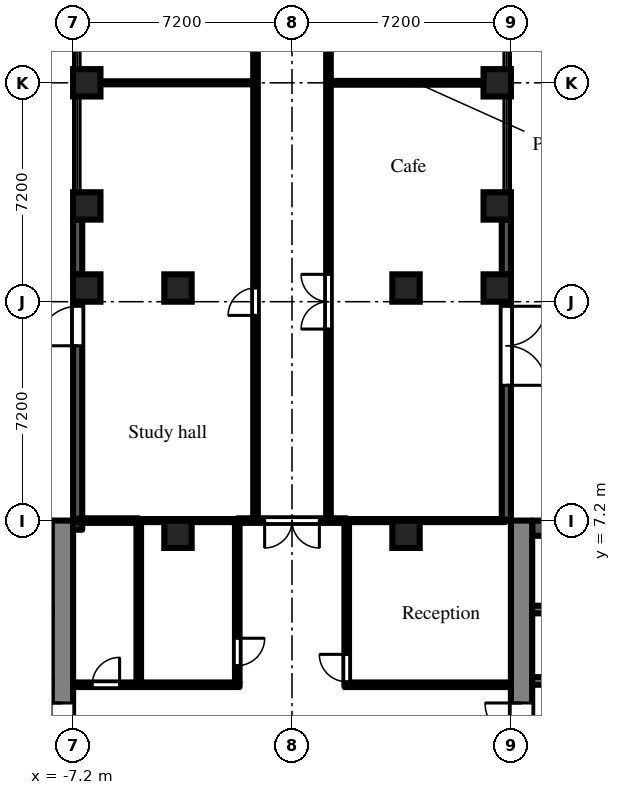
"""IFC4 building model, lengths in metres.
Left out: names, types, materials, properties, quantities, classifications, styles, units other than length and angle.
Written with IfcOpenShell. Run it as: python <this file> out.ifc"""

import sys

from ifc_helpers import new_model, si_unit, direction, frame, frame_2d, origin, origin_2d, place, context, subcontext, project, spatial, rectangle, extrude, element, fill, save


model = new_model("IFC4")
c1 = context("Model", 3, precision=1e-05, world=origin(), true_north=direction((0.0, 1.0)))
c2 = subcontext(c1, "Body", "Model", "MODEL_VIEW")
j1 = project(units=[si_unit("LENGTHUNIT", "METRE"), si_unit("PLANEANGLEUNIT", "RADIAN")], contexts=[c1])
p1 = place(None, origin())
s1 = spatial("IfcSite", under=j1, at=p1, CompositionType="ELEMENT")
p2 = place(p1, origin())
s2 = spatial("IfcBuilding", under=s1, at=p2, CompositionType="ELEMENT")
p3 = place(p2, frame((0.0, 0.0, 7.2)))
s3 = spatial("IfcBuildingStorey", under=s2, at=p3, CompositionType="ELEMENT", Elevation=7.2)
for number, where, z_axis, x_axis in (
    (1, (-6.75, 14.85, 0.0), (0.0, 0.0, 1.0), (1.0, 0.0, 0.0)),
    (2, (-6.75, 17.55, 0.0), (0.0, 0.0, 1.0), (1.0, 0.0, 0.0)),
    (3, (-6.75, 21.6, 0.0), (0.0, 0.0, 1.0), (1.0, 0.0, 0.0)),
    (4, (-3.75, 6.75, 0.0), (0.0, 0.0, 1.0), (1.0, 0.0, 0.0)),
    (5, (-3.75, 14.85, 0.0), (0.0, 0.0, 1.0), (1.0, 0.0, 0.0)),
    (6, (3.75, 6.75, 0.0), (0.0, 0.0, 1.0), (1.0, 0.0, 0.0)),
    (7, (3.75, 14.85, 0.0), (0.0, 0.0, 1.0), (1.0, 0.0, 0.0)),
    (8, (6.75, 14.85, 0.0), (0.0, 0.0, 1.0), (1.0, 0.0, 0.0)),
    (9, (6.75, 17.55, 0.0), (0.0, 0.0, 1.0), (1.0, 0.0, 0.0)),
    (10, (6.75, 21.6, 0.0), (0.0, 0.0, 1.0), (1.0, 0.0, 0.0)),
):
    element("IfcColumn", number, at=place(p3, frame(where, z_axis=z_axis, x_axis=x_axis)), inside=s3, PredefinedType="COLUMN", context=c2, shape_type="SweptSolid", body=[
        extrude(rectangle(XDim=0.9, YDim=0.9, at=origin_2d()), origin(), (0.0, 0.0, 1.0), 4.5),
    ])
p4 = place(p3, frame((7.05, 7.2, 0.0), z_axis=(0.0, 0.0, 1.0), x_axis=(0.0, 1.0, 0.0)))
e11 = element("IfcWall", 11, at=p4, inside=s3, PredefinedType="SOLIDWALL", context=c2, shape_type="SweptSolid", body=[
    extrude(rectangle(XDim=7.2, YDim=0.3, at=frame_2d((3.6, 0.0))), origin(), (0.0, 0.0, 1.0), 4.075),
])
p5 = place(p4, frame((4.45, 0.0, 0.0)))
e12 = element("IfcOpeningElement", 12, at=p5, cuts=e11, PredefinedType="OPENING", context=c2, shape_type="SweptSolid", body=[
    extrude(rectangle(XDim=2.6, YDim=2.4, at=frame_2d((1.3, 1.2))), frame((0.0, 0.16, 0.0), z_axis=(0.0, -1.0, 0.0), x_axis=(1.0, 0.0, 0.0)), (0.0, 0.0, 1.0), 0.32),
])
for number, where, z_axis, x_axis in (
    (13, (7.05, 15.3, 0.0), (0.0, 0.0, 1.0), (0.0, 1.0, 0.0)),
    (14, (-7.05, 17.1, 0.0), (0.0, 0.0, 1.0), (0.0, -1.0, 0.0)),
):
    element("IfcWall", number, at=place(p3, frame(where, z_axis=z_axis, x_axis=x_axis)), inside=s3, PredefinedType="SOLIDWALL", context=c2, shape_type="SweptSolid", body=[
        extrude(rectangle(XDim=1.8, YDim=0.3, at=frame_2d((0.9, 0.0))), origin(), (0.0, 0.0, 1.0), 3.6),
    ])
p6 = place(p3, frame((-7.05, 14.4, 0.0), z_axis=(0.0, 0.0, 1.0), x_axis=(0.0, -1.0, 0.0)))
e15 = element("IfcWall", 15, at=p6, inside=s3, PredefinedType="SOLIDWALL", context=c2, shape_type="SweptSolid", body=[
    extrude(rectangle(XDim=7.5, YDim=0.3, at=frame_2d((3.75, 0.0))), origin(), (0.0, 0.0, 1.0), 4.075),
])
p7 = place(p6, frame((0.15, 0.0, 0.0)))
e16 = element("IfcOpeningElement", 16, at=p7, cuts=e15, PredefinedType="OPENING", context=c2, shape_type="SweptSolid", body=[
    extrude(rectangle(XDim=1.3, YDim=2.1, at=frame_2d((0.65, 1.05))), frame((0.0, 0.16, 0.0), z_axis=(0.0, -1.0, 0.0), x_axis=(1.0, 0.0, 0.0)), (0.0, 0.0, 1.0), 0.32),
])
p8 = place(p3, frame((7.55, -7.2, 0.0), z_axis=(0.0, 0.0, 1.0), x_axis=(0.0, 1.0, 0.0)))
e17 = element("IfcWall", 17, at=p8, inside=s3, PredefinedType="SHEAR", context=c2, shape_type="SweptSolid", body=[
    extrude(rectangle(XDim=14.4, YDim=0.7, at=frame_2d((7.2, 0.0))), origin(), (0.0, 0.0, 1.0), 4.075),
])
p9 = place(p8, frame((6.0, 0.0, 0.0)))
e18 = element("IfcOpeningElement", 18, at=p9, cuts=e17, PredefinedType="OPENING", context=c2, shape_type="SweptSolid", body=[
    extrude(rectangle(XDim=2.4, YDim=2.2, at=frame_2d((1.2, 1.1))), frame((0.0, 0.36, 0.0), z_axis=(0.0, -1.0, 0.0), x_axis=(1.0, 0.0, 0.0)), (0.0, 0.0, 1.0), 0.72),
])
p10 = place(p3, frame((7.9, 6.95, 0.0), z_axis=(0.0, 0.0, 1.0), x_axis=(1.0, 0.0, 0.0)))
e19 = element("IfcWall", 19, at=p10, inside=s3, PredefinedType="SHEAR", context=c2, shape_type="SweptSolid", body=[
    extrude(rectangle(XDim=12.95, YDim=0.5, at=frame_2d((6.475, 0.0))), origin(), (0.0, 0.0, 1.0), 4.075),
])
p11 = place(p3, frame((7.9, 1.925, 0.0), z_axis=(0.0, 0.0, 1.0), x_axis=(1.0, 0.0, 0.0)))
e20 = element("IfcWall", 20, at=p11, inside=s3, PredefinedType="SHEAR", context=c2, shape_type="SweptSolid", body=[
    extrude(rectangle(XDim=12.95, YDim=0.25, at=frame_2d((6.475, 0.0))), origin(), (0.0, 0.0, 1.0), 4.075),
])
p12 = place(p11, frame((0.525, 0.0, 0.0)))
e21 = element("IfcOpeningElement", 21, at=p12, cuts=e20, PredefinedType="OPENING", context=c2, shape_type="SweptSolid", body=[
    extrude(rectangle(XDim=0.9, YDim=2.1, at=frame_2d((0.45, 1.05))), frame((0.0, 0.135, 0.0), z_axis=(0.0, -1.0, 0.0), x_axis=(1.0, 0.0, 0.0)), (0.0, 0.0, 1.0), 0.27),
])
p13 = place(p11, frame((2.625, 0.0, 0.0)))
e22 = element("IfcOpeningElement", 22, at=p13, cuts=e20, PredefinedType="OPENING", context=c2, shape_type="SweptSolid", body=[
    extrude(rectangle(XDim=1.1, YDim=2.1, at=frame_2d((0.55, 1.05))), frame((0.0, 0.135, 0.0), z_axis=(0.0, -1.0, 0.0), x_axis=(1.0, 0.0, 0.0)), (0.0, 0.0, 1.0), 0.27),
])
p14 = place(p11, frame((4.925, 0.0, 0.0)))
e23 = element("IfcOpeningElement", 23, at=p14, cuts=e20, PredefinedType="OPENING", context=c2, shape_type="SweptSolid", body=[
    extrude(rectangle(XDim=0.9, YDim=2.1, at=frame_2d((0.45, 1.05))), frame((0.0, 0.135, 0.0), z_axis=(0.0, -1.0, 0.0), x_axis=(1.0, 0.0, 0.0)), (0.0, 0.0, 1.0), 0.27),
])
p15 = place(p11, frame((8.225, 0.0, 0.0)))
e24 = element("IfcOpeningElement", 24, at=p15, cuts=e20, PredefinedType="OPENING", context=c2, shape_type="SweptSolid", body=[
    extrude(rectangle(XDim=0.9, YDim=2.1, at=frame_2d((0.45, 1.05))), frame((0.0, 0.135, 0.0), z_axis=(0.0, -1.0, 0.0), x_axis=(1.0, 0.0, 0.0)), (0.0, 0.0, 1.0), 0.27),
])
p16 = place(p3, frame((7.9, 4.275, 0.0), z_axis=(0.0, 0.0, 1.0), x_axis=(1.0, 0.0, 0.0)))
e25 = element("IfcWall", 25, at=p16, inside=s3, PredefinedType="SHEAR", context=c2, shape_type="SweptSolid", body=[
    extrude(rectangle(XDim=1.95, YDim=0.25, at=frame_2d((0.975, 0.0))), origin(), (0.0, 0.0, 1.0), 4.075),
])
p17 = place(p3, frame((-7.55, -7.2, 0.0), z_axis=(0.0, 0.0, 1.0), x_axis=(0.0, 1.0, 0.0)))
e26 = element("IfcWall", 26, at=p17, inside=s3, PredefinedType="SHEAR", context=c2, shape_type="SweptSolid", body=[
    extrude(rectangle(XDim=14.4, YDim=0.7, at=frame_2d((7.2, 0.0))), origin(), (0.0, 0.0, 1.0), 4.075),
])
p18 = place(p17, frame((6.0, 0.0, 0.0)))
e27 = element("IfcOpeningElement", 27, at=p18, cuts=e26, PredefinedType="OPENING", context=c2, shape_type="SweptSolid", body=[
    extrude(rectangle(XDim=2.4, YDim=2.2, at=frame_2d((1.2, 1.1))), frame((0.0, 0.36, 0.0), z_axis=(0.0, -1.0, 0.0), x_axis=(1.0, 0.0, 0.0)), (0.0, 0.0, 1.0), 0.72),
])
p19 = place(p3, frame((-7.2, 1.8, 0.0), z_axis=(0.0, 0.0, 1.0), x_axis=(1.0, 0.0, 0.0)))
e28 = element("IfcWall", 28, at=p19, inside=s3, PredefinedType="PARTITIONING", context=c2, shape_type="SweptSolid", body=[
    extrude(rectangle(XDim=5.475, YDim=0.15, at=frame_2d((2.737, 0.0))), origin(), (0.0, 0.0, 1.0), 4.075),
])
p20 = place(p19, frame((0.63, 0.0, 0.0)))
e29 = element("IfcOpeningElement", 29, at=p20, cuts=e28, PredefinedType="OPENING", context=c2, shape_type="SweptSolid", body=[
    extrude(rectangle(XDim=0.9, YDim=2.1, at=frame_2d((0.45, 1.05))), frame((0.0, 0.085, 0.0), z_axis=(0.0, -1.0, 0.0), x_axis=(1.0, 0.0, 0.0)), (0.0, 0.0, 1.0), 0.17),
])
p21 = place(p3, frame((-7.02, 7.2, 0.0), z_axis=(0.0, 0.0, 1.0), x_axis=(1.0, 0.0, 0.0)))
e30 = element("IfcWall", 30, at=p21, inside=s3, PredefinedType="PARTITIONING", context=c2, shape_type="SweptSolid", body=[
    extrude(rectangle(XDim=1.98, YDim=0.15, at=frame_2d((0.99, 0.0))), origin(), (0.0, 0.0, 1.0), 3.6),
])
p22 = place(p3, frame((-6.9, 21.6, 0.0), z_axis=(0.0, 0.0, 1.0), x_axis=(1.0, 0.0, 0.0)))
e31 = element("IfcWall", 31, at=p22, inside=s3, PredefinedType="PARTITIONING", context=c2, shape_type="SweptSolid", body=[
    extrude(rectangle(XDim=5.625, YDim=0.1, at=frame_2d((2.812, 0.0))), origin(), (0.0, 0.0, 1.0), 4.075),
])
p23 = place(p3, frame((-5.04, 1.875, 0.0), z_axis=(0.0, 0.0, 1.0), x_axis=(0.0, 1.0, 0.0)))
e32 = element("IfcWall", 32, at=p23, inside=s3, PredefinedType="PARTITIONING", context=c2, shape_type="SweptSolid", body=[
    extrude(rectangle(XDim=5.25, YDim=0.15, at=frame_2d((2.625, 0.0))), origin(), (0.0, 0.0, 1.0), 4.075),
])
p24 = place(p3, frame((-5.04, 7.2, 0.0), z_axis=(0.0, 0.0, 1.0), x_axis=(1.0, 0.0, 0.0)))
e33 = element("IfcWall", 33, at=p24, inside=s3, PredefinedType="PARTITIONING", context=c2, shape_type="SweptSolid", body=[
    extrude(rectangle(XDim=1.29, YDim=0.1, at=frame_2d((0.645, 0.0))), origin(), (0.0, 0.0, 1.0), 3.6),
])
p25 = place(p3, frame((-1.8, 1.875, 0.0), z_axis=(0.0, 0.0, 1.0), x_axis=(0.0, 1.0, 0.0)))
e34 = element("IfcWall", 34, at=p25, inside=s3, PredefinedType="PARTITIONING", context=c2, shape_type="SweptSolid", body=[
    extrude(rectangle(XDim=5.25, YDim=0.15, at=frame_2d((2.625, 0.0))), origin(), (0.0, 0.0, 1.0), 4.075),
])
p26 = place(p25, frame((0.555, 0.0, 0.0)))
e35 = element("IfcOpeningElement", 35, at=p26, cuts=e34, PredefinedType="OPENING", context=c2, shape_type="SweptSolid", body=[
    extrude(rectangle(XDim=0.9, YDim=2.1, at=frame_2d((0.45, 1.05))), frame((0.0, 0.085, 0.0), z_axis=(0.0, -1.0, 0.0), x_axis=(1.0, 0.0, 0.0)), (0.0, 0.0, 1.0), 0.17),
])
p27 = place(p3, frame((-1.8, 7.2, 0.0), z_axis=(0.0, 0.0, 1.0), x_axis=(1.0, 0.0, 0.0)))
e36 = element("IfcWall", 36, at=p27, inside=s3, PredefinedType="PARTITIONING", context=c2, shape_type="SweptSolid", body=[
    extrude(rectangle(XDim=3.6, YDim=0.15, at=frame_2d((1.8, 0.0))), origin(), (0.0, 0.0, 1.0), 4.075),
])
p28 = place(p27, frame((0.9, 0.0, 0.0)))
e37 = element("IfcOpeningElement", 37, at=p28, cuts=e36, PredefinedType="OPENING", context=c2, shape_type="SweptSolid", body=[
    extrude(rectangle(XDim=1.8, YDim=2.1, at=frame_2d((0.9, 1.05))), frame((0.0, 0.085, 0.0), z_axis=(0.0, -1.0, 0.0), x_axis=(1.0, 0.0, 0.0)), (0.0, 0.0, 1.0), 0.17),
])
p29 = place(p3, frame((-1.2, 7.275, 0.0), z_axis=(0.0, 0.0, 1.0), x_axis=(0.0, 1.0, 0.0)))
e38 = element("IfcWall", 38, at=p29, inside=s3, PredefinedType="PARTITIONING", context=c2, shape_type="SweptSolid", body=[
    extrude(rectangle(XDim=29.225, YDim=0.15, at=frame_2d((14.613, 0.0))), origin(), (0.0, 0.0, 1.0), 4.075),
])
p30 = place(p29, frame((6.675, 0.0, 0.0)))
e39 = element("IfcOpeningElement", 39, at=p30, cuts=e38, PredefinedType="OPENING", context=c2, shape_type="SweptSolid", body=[
    extrude(rectangle(XDim=0.9, YDim=2.1, at=frame_2d((0.45, 1.05))), frame((0.0, 0.085, 0.0), z_axis=(0.0, -1.0, 0.0), x_axis=(1.0, 0.0, 0.0)), (0.0, 0.0, 1.0), 0.17),
])
p31 = place(p29, frame((18.675, 0.0, 0.0)))
e40 = element("IfcOpeningElement", 40, at=p31, cuts=e38, PredefinedType="OPENING", context=c2, shape_type="SweptSolid", body=[
    extrude(rectangle(XDim=0.9, YDim=2.1, at=frame_2d((0.45, 1.05))), frame((0.0, 0.085, 0.0), z_axis=(0.0, -1.0, 0.0), x_axis=(1.0, 0.0, 0.0)), (0.0, 0.0, 1.0), 0.17),
])
p32 = place(p29, frame((26.125, 0.0, 0.0)))
e41 = element("IfcOpeningElement", 41, at=p32, cuts=e38, PredefinedType="OPENING", context=c2, shape_type="SweptSolid", body=[
    extrude(rectangle(XDim=0.9, YDim=2.1, at=frame_2d((0.45, 1.05))), frame((0.0, 0.085, 0.0), z_axis=(0.0, -1.0, 0.0), x_axis=(1.0, 0.0, 0.0)), (0.0, 0.0, 1.0), 0.17),
])
p33 = place(p3, frame((1.2, 7.275, 0.0), z_axis=(0.0, 0.0, 1.0), x_axis=(0.0, 1.0, 0.0)))
e42 = element("IfcWall", 42, at=p33, inside=s3, PredefinedType="PARTITIONING", context=c2, shape_type="SweptSolid", body=[
    extrude(rectangle(XDim=29.225, YDim=0.15, at=frame_2d((14.613, 0.0))), origin(), (0.0, 0.0, 1.0), 4.075),
])
p34 = place(p33, frame((6.225, 0.0, 0.0)))
e43 = element("IfcOpeningElement", 43, at=p34, cuts=e42, PredefinedType="OPENING", context=c2, shape_type="SweptSolid", body=[
    extrude(rectangle(XDim=1.8, YDim=2.1, at=frame_2d((0.9, 1.05))), frame((0.0, 0.085, 0.0), z_axis=(0.0, -1.0, 0.0), x_axis=(1.0, 0.0, 0.0)), (0.0, 0.0, 1.0), 0.17),
])
p35 = place(p33, frame((16.275, 0.0, 0.0)))
e44 = element("IfcOpeningElement", 44, at=p35, cuts=e42, PredefinedType="OPENING", context=c2, shape_type="SweptSolid", body=[
    extrude(rectangle(XDim=0.9, YDim=2.1, at=frame_2d((0.45, 1.05))), frame((0.0, 0.085, 0.0), z_axis=(0.0, -1.0, 0.0), x_axis=(1.0, 0.0, 0.0)), (0.0, 0.0, 1.0), 0.17),
])
p36 = place(p33, frame((23.725, 0.0, 0.0)))
e45 = element("IfcOpeningElement", 45, at=p36, cuts=e42, PredefinedType="OPENING", context=c2, shape_type="SweptSolid", body=[
    extrude(rectangle(XDim=0.9, YDim=2.1, at=frame_2d((0.45, 1.05))), frame((0.0, 0.085, 0.0), z_axis=(0.0, -1.0, 0.0), x_axis=(1.0, 0.0, 0.0)), (0.0, 0.0, 1.0), 0.17),
])
p37 = place(p3, frame((1.275, 21.6, 0.0), z_axis=(0.0, 0.0, 1.0), x_axis=(1.0, 0.0, 0.0)))
e46 = element("IfcWall", 46, at=p37, inside=s3, PredefinedType="PARTITIONING", context=c2, shape_type="SweptSolid", body=[
    extrude(rectangle(XDim=5.625, YDim=0.125, at=frame_2d((2.812, 0.0))), origin(), (0.0, 0.0, 1.0), 4.075),
])
p38 = place(p3, frame((1.8, 1.725, 0.0), z_axis=(0.0, 0.0, 1.0), x_axis=(0.0, 1.0, 0.0)))
e47 = element("IfcWall", 47, at=p38, inside=s3, PredefinedType="PARTITIONING", context=c2, shape_type="SweptSolid", body=[
    extrude(rectangle(XDim=5.4, YDim=0.15, at=frame_2d((2.7, 0.0))), origin(), (0.0, 0.0, 1.0), 4.075),
])
p39 = place(p38, frame((0.175, 0.0, 0.0)))
e48 = element("IfcOpeningElement", 48, at=p39, cuts=e47, PredefinedType="OPENING", context=c2, shape_type="SweptSolid", body=[
    extrude(rectangle(XDim=0.9, YDim=2.1, at=frame_2d((0.45, 1.05))), frame((0.0, 0.085, 0.0), z_axis=(0.0, -1.0, 0.0), x_axis=(1.0, 0.0, 0.0)), (0.0, 0.0, 1.0), 0.17),
])
p40 = place(p3, frame((1.875, 1.8, 0.0), z_axis=(0.0, 0.0, 1.0), x_axis=(1.0, 0.0, 0.0)))
e49 = element("IfcWall", 49, at=p40, inside=s3, PredefinedType="PARTITIONING", context=c2, shape_type="SweptSolid", body=[
    extrude(rectangle(XDim=5.325, YDim=0.15, at=frame_2d((2.663, 0.0))), origin(), (0.0, 0.0, 1.0), 4.075),
])
for number, where, z_axis, x_axis in (
    (50, (1.8, 7.2, 0.0), (0.0, 0.0, 1.0), (1.0, 0.0, 0.0)),
    (51, (-3.75, 7.2, 0.0), (0.0, 0.0, 1.0), (1.0, 0.0, 0.0)),
):
    element("IfcWall", number, at=place(p3, frame(where, z_axis=z_axis, x_axis=x_axis)), inside=s3, PredefinedType="PARTITIONING", context=c2, shape_type="SweptSolid", body=[
        extrude(rectangle(XDim=1.95, YDim=0.1, at=frame_2d((0.975, 0.0))), origin(), (0.0, 0.0, 1.0), 4.075),
    ])
p41 = place(p3, frame((3.75, 7.2, 0.0), z_axis=(0.0, 0.0, 1.0), x_axis=(1.0, 0.0, 0.0)))
e52 = element("IfcWall", 52, at=p41, inside=s3, PredefinedType="PARTITIONING", context=c2, shape_type="SweptSolid", body=[
    extrude(rectangle(XDim=3.27, YDim=0.1, at=frame_2d((1.635, 0.0))), origin(), (0.0, 0.0, 1.0), 3.6),
])
p42 = place(p5, frame((2.6, 0.0, 0.0), z_axis=(0.0, 0.0, 1.0), x_axis=(-1.0, 0.0, 0.0)))
e53 = element("IfcDoor", 53, at=p42, inside=s3, OperationType="DOUBLE_DOOR_DOUBLE_SWING", PredefinedType="DOOR", context=c2, shape_type="SweptSolid", body=[
    extrude(rectangle(XDim=2.6, YDim=2.4, at=frame_2d((1.3, 1.2))), frame((0.0, 0.025, 0.0), z_axis=(0.0, -1.0, 0.0), x_axis=(1.0, 0.0, 0.0)), (0.0, 0.0, 1.0), 0.05),
])
fill(e12, e53)
p43 = place(p7, frame((1.3, 0.0, 0.0), z_axis=(0.0, 0.0, 1.0), x_axis=(-1.0, 0.0, 0.0)))
e54 = element("IfcDoor", 54, at=p43, inside=s3, OperationType="SINGLE_SWING_LEFT", PredefinedType="DOOR", context=c2, shape_type="SweptSolid", body=[
    extrude(rectangle(XDim=1.3, YDim=2.1, at=frame_2d((0.65, 1.05))), frame((0.0, 0.025, 0.0), z_axis=(0.0, -1.0, 0.0), x_axis=(1.0, 0.0, 0.0)), (0.0, 0.0, 1.0), 0.05),
])
fill(e16, e54)
p44 = place(p9, origin())
e55 = element("IfcDoor", 55, at=p44, inside=s3, OperationType="DOUBLE_DOOR_DOUBLE_SWING", PredefinedType="DOOR", context=c2, shape_type="SweptSolid", body=[
    extrude(rectangle(XDim=2.4, YDim=2.2, at=frame_2d((1.2, 1.1))), frame((0.0, 0.025, 0.0), z_axis=(0.0, -1.0, 0.0), x_axis=(1.0, 0.0, 0.0)), (0.0, 0.0, 1.0), 0.05),
])
fill(e18, e55)
p45 = place(p18, origin())
e56 = element("IfcDoor", 56, at=p45, inside=s3, OperationType="DOUBLE_DOOR_DOUBLE_SWING", PredefinedType="DOOR", context=c2, shape_type="SweptSolid", body=[
    extrude(rectangle(XDim=2.4, YDim=2.2, at=frame_2d((1.2, 1.1))), frame((0.0, 0.025, 0.0), z_axis=(0.0, -1.0, 0.0), x_axis=(1.0, 0.0, 0.0)), (0.0, 0.0, 1.0), 0.05),
])
fill(e27, e56)
p46 = place(p39, origin())
e57 = element("IfcDoor", 57, at=p46, inside=s3, OperationType="SINGLE_SWING_RIGHT", PredefinedType="DOOR", context=c2, shape_type="SweptSolid", body=[
    extrude(rectangle(XDim=0.9, YDim=2.1, at=frame_2d((0.45, 1.05))), frame((0.0, 0.025, 0.0), z_axis=(0.0, -1.0, 0.0), x_axis=(1.0, 0.0, 0.0)), (0.0, 0.0, 1.0), 0.05),
])
fill(e48, e57)
p47 = place(p26, frame((0.9, 0.0, 0.0), z_axis=(0.0, 0.0, 1.0), x_axis=(-1.0, 0.0, 0.0)))
e58 = element("IfcDoor", 58, at=p47, inside=s3, OperationType="SINGLE_SWING_LEFT", PredefinedType="DOOR", context=c2, shape_type="SweptSolid", body=[
    extrude(rectangle(XDim=0.9, YDim=2.1, at=frame_2d((0.45, 1.05))), frame((0.0, 0.025, 0.0), z_axis=(0.0, -1.0, 0.0), x_axis=(1.0, 0.0, 0.0)), (0.0, 0.0, 1.0), 0.05),
])
fill(e35, e58)
p48 = place(p20, origin())
e59 = element("IfcDoor", 59, at=p48, inside=s3, OperationType="SINGLE_SWING_RIGHT", PredefinedType="DOOR", context=c2, shape_type="SweptSolid", body=[
    extrude(rectangle(XDim=0.9, YDim=2.1, at=frame_2d((0.45, 1.05))), frame((0.0, 0.025, 0.0), z_axis=(0.0, -1.0, 0.0), x_axis=(1.0, 0.0, 0.0)), (0.0, 0.0, 1.0), 0.05),
])
fill(e29, e59)
p49 = place(p28, frame((1.8, 0.0, 0.0), z_axis=(0.0, 0.0, 1.0), x_axis=(-1.0, 0.0, 0.0)))
e60 = element("IfcDoor", 60, at=p49, inside=s3, OperationType="DOUBLE_DOOR_DOUBLE_SWING", PredefinedType="DOOR", context=c2, shape_type="SweptSolid", body=[
    extrude(rectangle(XDim=1.8, YDim=2.1, at=frame_2d((0.9, 1.05))), frame((0.0, 0.025, 0.0), z_axis=(0.0, -1.0, 0.0), x_axis=(1.0, 0.0, 0.0)), (0.0, 0.0, 1.0), 0.05),
])
fill(e37, e60)
p50 = place(p30, origin())
e61 = element("IfcDoor", 61, at=p50, inside=s3, OperationType="SINGLE_SWING_LEFT", PredefinedType="DOOR", context=c2, shape_type="SweptSolid", body=[
    extrude(rectangle(XDim=0.9, YDim=2.1, at=frame_2d((0.45, 1.05))), frame((0.0, 0.025, 0.0), z_axis=(0.0, -1.0, 0.0), x_axis=(1.0, 0.0, 0.0)), (0.0, 0.0, 1.0), 0.05),
])
fill(e39, e61)
p51 = place(p34, origin())
e62 = element("IfcDoor", 62, at=p51, inside=s3, OperationType="DOUBLE_DOOR_DOUBLE_SWING", PredefinedType="DOOR", context=c2, shape_type="SweptSolid", body=[
    extrude(rectangle(XDim=1.8, YDim=2.1, at=frame_2d((0.9, 1.05))), frame((0.0, 0.025, 0.0), z_axis=(0.0, -1.0, 0.0), x_axis=(1.0, 0.0, 0.0)), (0.0, 0.0, 1.0), 0.05),
])
fill(e43, e62)
save(model, sys.argv[1])
